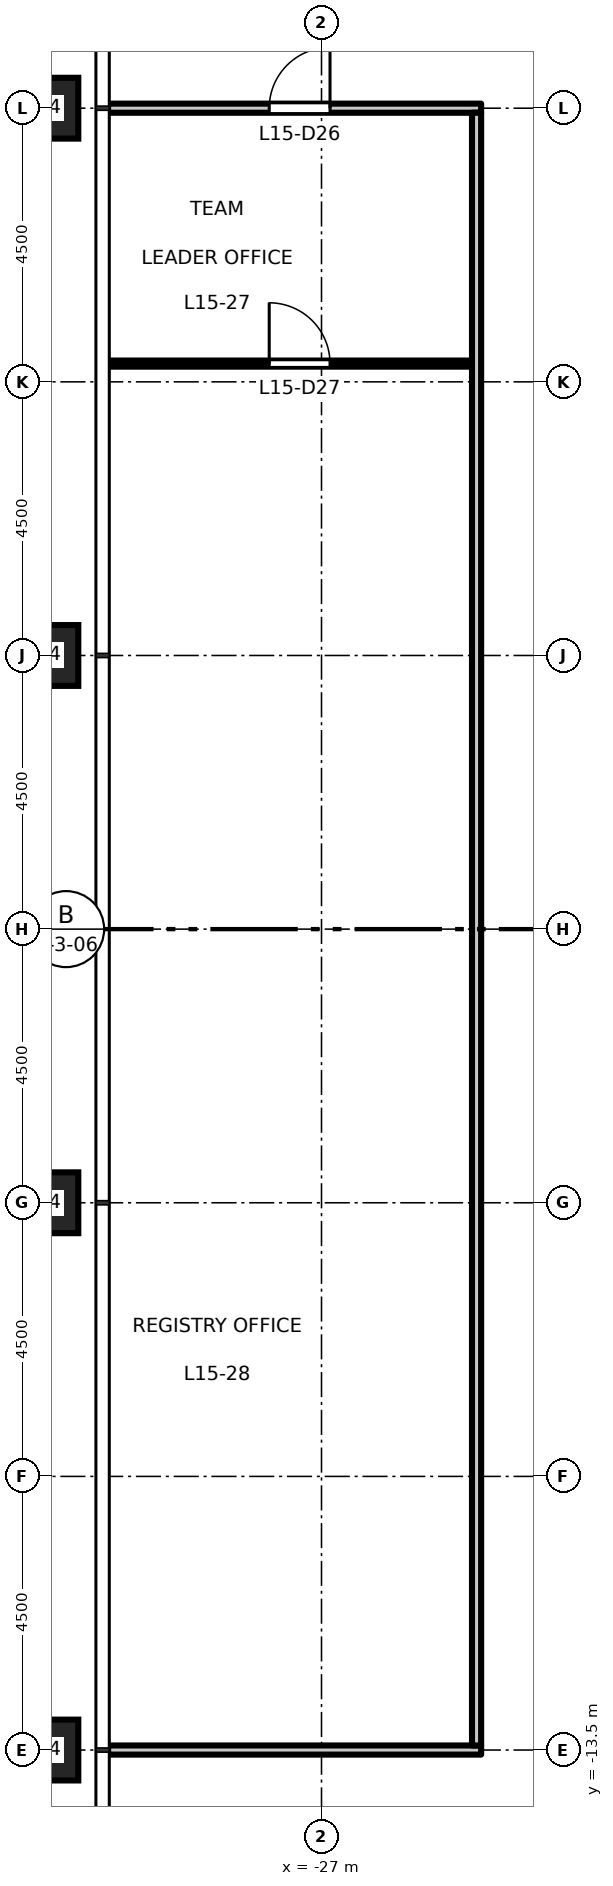
"""IFC4 building model, lengths in metres.
Left out: names, types, materials, properties, quantities, classifications, styles, units other than length and angle.
Written with IfcOpenShell. Run it as: python <this file> out.ifc"""

import sys

from ifc_helpers import new_model, si_unit, direction, frame, frame_2d, origin, origin_2d, place, context, subcontext, project, spatial, rectangle, hollow_rectangle, extrude, element, fill, save


model = new_model("IFC4")
c1 = context("Model", 3, precision=1e-05, world=origin(), true_north=direction((0.0, 1.0)))
c2 = subcontext(c1, "Body", "Model", "MODEL_VIEW")
j1 = project(units=[si_unit("LENGTHUNIT", "METRE"), si_unit("PLANEANGLEUNIT", "RADIAN")], contexts=[c1])
p1 = place(None, origin())
s1 = spatial("IfcSite", under=j1, at=p1, CompositionType="ELEMENT")
p2 = place(p1, origin())
s2 = spatial("IfcBuilding", under=s1, at=p2, CompositionType="ELEMENT")
p3 = place(p2, frame((0.0, 0.0, 71.7)))
s3 = spatial("IfcBuildingStorey", under=s2, at=p3, CompositionType="ELEMENT", Elevation=71.7)
for number, where, z_axis, x_axis in (
    (1, (-31.5, 13.5, 0.0), (0.0, 0.0, 1.0), (1.0, 0.0, 0.0)),
    (2, (-31.5, 4.5, 0.0), (0.0, 0.0, 1.0), (1.0, 0.0, 0.0)),
    (3, (-31.5, -4.5, 0.0), (0.0, 0.0, 1.0), (1.0, 0.0, 0.0)),
    (4, (-31.5, -13.5, 0.0), (0.0, 0.0, 1.0), (1.0, 0.0, 0.0)),
):
    element("IfcColumn", number, at=place(p3, frame(where, z_axis=z_axis, x_axis=x_axis)), inside=s3, PredefinedType="COLUMN", context=c2, shape_type="SweptSolid", body=[
        extrude(hollow_rectangle(XDim=1.0, YDim=1.0, WallThickness=0.06, at=origin_2d()), origin(), (0.0, 0.0, 1.0), 4.5),
    ])
p4 = place(p3, frame((-30.51, -13.5, 0.0), z_axis=(0.0, 0.0, 1.0), x_axis=(1.0, 0.0, 0.0)))
e5 = element("IfcWall", 5, at=p4, inside=s3, PredefinedType="PARTITIONING", context=c2, shape_type="SweptSolid", body=[
    extrude(rectangle(XDim=6.135, YDim=0.15, at=frame_2d((3.067, 0.0))), origin(), (0.0, 0.0, 1.0), 3.35),
])
p5 = place(p3, frame((-30.51, 9.3, 0.0), z_axis=(0.0, 0.0, 1.0), x_axis=(1.0, 0.0, 0.0)))
e6 = element("IfcWall", 6, at=p5, inside=s3, PredefinedType="PARTITIONING", context=c2, shape_type="SweptSolid", body=[
    extrude(rectangle(XDim=5.985, YDim=0.1, at=frame_2d((2.993, 0.0))), origin(), (0.0, 0.0, 1.0), 4.35),
])
p6 = place(p5, frame((2.65, 0.0, 0.0)))
e7 = element("IfcOpeningElement", 7, at=p6, cuts=e6, PredefinedType="OPENING", context=c2, shape_type="SweptSolid", body=[
    extrude(rectangle(XDim=1.0, YDim=2.1, at=frame_2d((0.5, 1.05))), frame((0.0, 0.06, 0.0), z_axis=(0.0, -1.0, 0.0), x_axis=(1.0, 0.0, 0.0)), (0.0, 0.0, 1.0), 0.12),
])
p7 = place(p3, frame((-30.51, 13.5, 0.0), z_axis=(0.0, 0.0, 1.0), x_axis=(1.0, 0.0, 0.0)))
e8 = element("IfcWall", 8, at=p7, inside=s3, PredefinedType="PARTITIONING", context=c2, shape_type="SweptSolid", body=[
    extrude(rectangle(XDim=6.135, YDim=0.15, at=frame_2d((3.067, 0.0))), origin(), (0.0, 0.0, 1.0), 3.35),
])
p8 = place(p7, frame((2.65, 0.0, 0.0)))
e9 = element("IfcOpeningElement", 9, at=p8, cuts=e8, PredefinedType="OPENING", context=c2, shape_type="SweptSolid", body=[
    extrude(rectangle(XDim=1.0, YDim=2.1, at=frame_2d((0.5, 1.05))), frame((0.0, 0.085, 0.0), z_axis=(0.0, -1.0, 0.0), x_axis=(1.0, 0.0, 0.0)), (0.0, 0.0, 1.0), 0.17),
])
p9 = place(p3, frame((-24.45, -13.425, 0.0), z_axis=(0.0, 0.0, 1.0), x_axis=(0.0, 1.0, 0.0)))
e10 = element("IfcWall", 10, at=p9, inside=s3, PredefinedType="PARTITIONING", context=c2, shape_type="SweptSolid", body=[
    extrude(rectangle(XDim=26.85, YDim=0.15, at=frame_2d((13.425, 0.0))), origin(), (0.0, 0.0, 1.0), 4.35),
])
p10 = place(p8, origin())
e11 = element("IfcDoor", 11, at=p10, inside=s3, OperationType="SINGLE_SWING_RIGHT", PredefinedType="DOOR", context=c2, shape_type="SweptSolid", body=[
    extrude(rectangle(XDim=1.0, YDim=2.1, at=frame_2d((0.5, 1.05))), frame((0.0, 0.025, 0.0), z_axis=(0.0, -1.0, 0.0), x_axis=(1.0, 0.0, 0.0)), (0.0, 0.0, 1.0), 0.05),
])
fill(e9, e11)
p11 = place(p6, origin())
e12 = element("IfcDoor", 12, at=p11, inside=s3, OperationType="SINGLE_SWING_LEFT", PredefinedType="DOOR", context=c2, shape_type="SweptSolid", body=[
    extrude(rectangle(XDim=1.0, YDim=2.1, at=frame_2d((0.5, 1.05))), frame((0.0, 0.025, 0.0), z_axis=(0.0, -1.0, 0.0), x_axis=(1.0, 0.0, 0.0)), (0.0, 0.0, 1.0), 0.05),
])
fill(e7, e12)
save(model, sys.argv[1])
